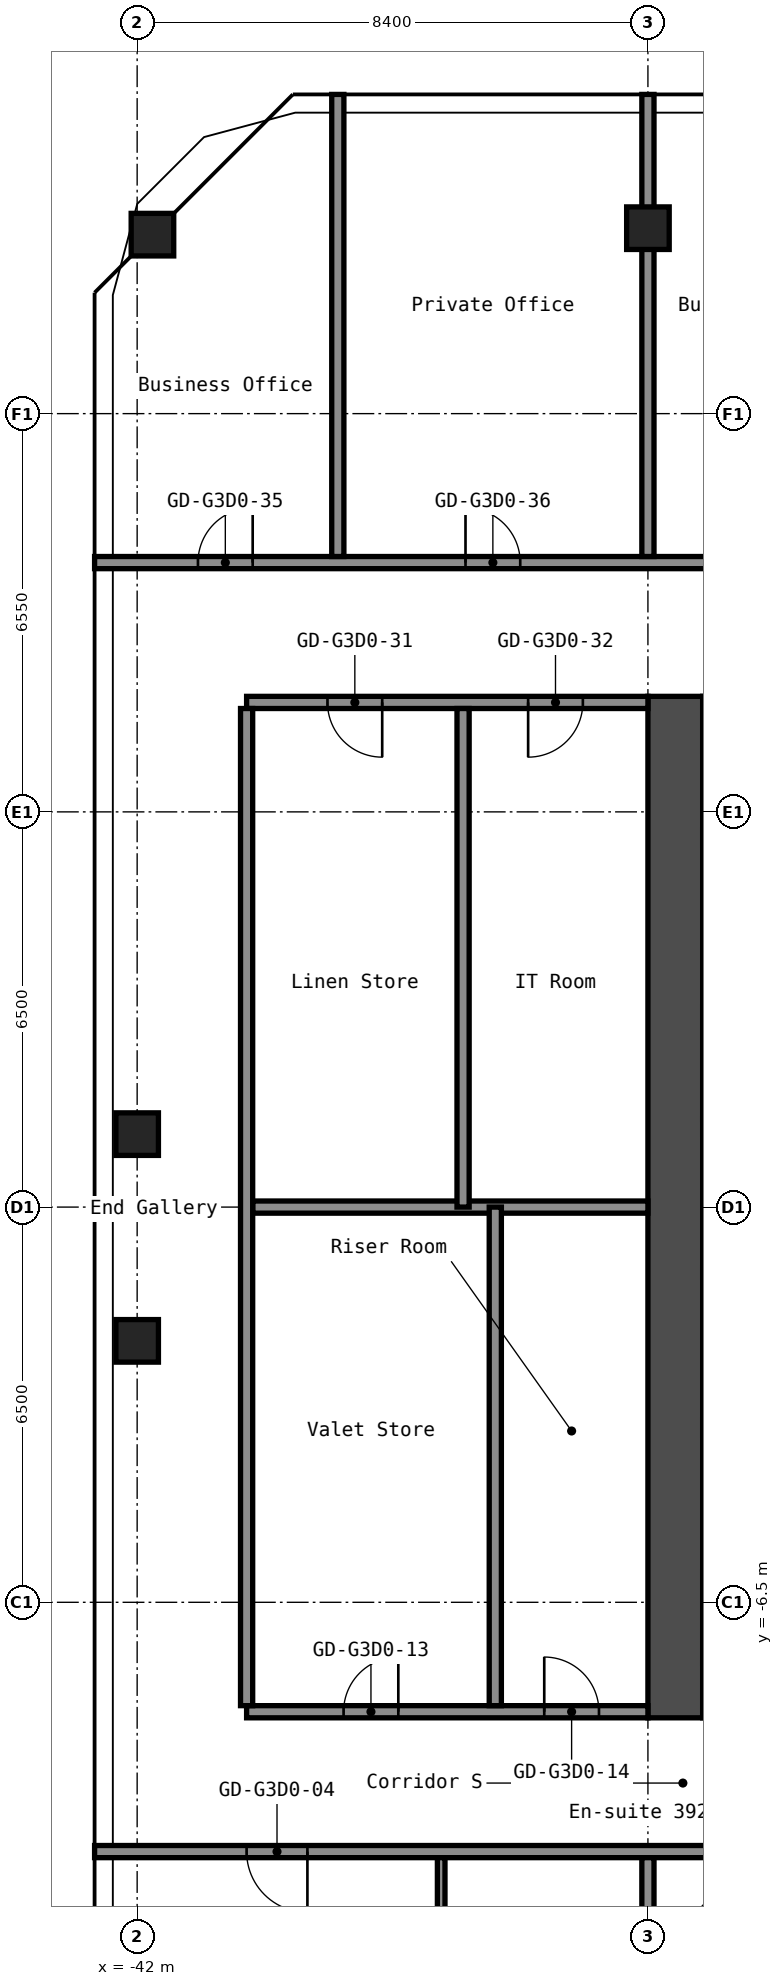
"""IFC4 building model, lengths in metres.
Left out: names, types, materials, properties, quantities, classifications, styles, units other than length and angle.
Written with IfcOpenShell. Run it as: python <this file> out.ifc"""

import sys

from ifc_helpers import new_model, si_unit, direction, frame, frame_2d, origin, origin_2d, place, context, subcontext, project, spatial, rectangle, hollow_rectangle, extrude, element, fill, save


model = new_model("IFC4")
c1 = context("Model", 3, precision=1e-05, world=origin(), true_north=direction((0.0, 1.0)))
c2 = subcontext(c1, "Body", "Model", "MODEL_VIEW")
j1 = project(units=[si_unit("LENGTHUNIT", "METRE"), si_unit("PLANEANGLEUNIT", "RADIAN")], contexts=[c1])
p1 = place(None, origin())
s1 = spatial("IfcSite", under=j1, at=p1, CompositionType="ELEMENT")
p2 = place(p1, origin())
s2 = spatial("IfcBuilding", under=s1, at=p2, CompositionType="ELEMENT")
p3 = place(p2, frame((0.0, 0.0, 140.6)))
s3 = spatial("IfcBuildingStorey", under=s2, at=p3, CompositionType="ELEMENT", Elevation=140.6)
for number, where, z_axis, x_axis in (
    (1, (-42.0, -2.2, 0.0), (0.0, 0.0, 1.0), (1.0, 0.0, 0.0)),
    (2, (-42.0, 1.2, 0.0), (0.0, 0.0, 1.0), (1.0, 0.0, 0.0)),
    (3, (-41.749, 15.994, 0.0), (0.0, 0.0, 1.0), (1.0, 0.0, 0.0)),
    (4, (-33.6, 16.1, 0.0), (0.0, 0.0, 1.0), (1.0, 0.0, 0.0)),
):
    element("IfcColumn", number, at=place(p3, frame(where, z_axis=z_axis, x_axis=x_axis)), inside=s3, PredefinedType="COLUMN", context=c2, shape_type="SweptSolid", body=[
        extrude(hollow_rectangle(XDim=0.7, YDim=0.7, WallThickness=0.028, at=origin_2d()), origin(), (0.0, 0.0, 1.0), 2.75),
    ])
p4 = place(p3, frame((-33.15, -8.4, 0.0), z_axis=(0.0, 0.0, 1.0), x_axis=(0.0, 1.0, 0.0)))
e5 = element("IfcWall", 5, at=p4, inside=s3, PredefinedType="SHEAR", context=c2, shape_type="SweptSolid", body=[
    extrude(rectangle(XDim=16.8, YDim=0.9, at=frame_2d((8.4, 0.0))), origin(), (0.0, 0.0, 1.0), 2.75),
])
p5 = place(p3, frame((-32.7, 1.325, 0.0), z_axis=(0.0, 0.0, 1.0), x_axis=(1.0, 0.0, 0.0)))
e6 = element("IfcWall", 6, at=p5, inside=s3, PredefinedType="SHEAR", context=c2, shape_type="SweptSolid", body=[
    extrude(rectangle(XDim=5.05, YDim=0.25, at=frame_2d((2.525, 0.0))), origin(), (0.0, 0.0, 1.0), 2.75),
])
p6 = place(p5, frame((3.3, 0.0, 0.0)))
e7 = element("IfcOpeningElement", 7, at=p6, cuts=e6, PredefinedType="OPENING", context=c2, shape_type="SweptSolid", body=[
    extrude(rectangle(XDim=1.2, YDim=2.1, at=frame_2d((0.6, 1.05))), frame((0.0, 0.135, 0.0), z_axis=(0.0, -1.0, 0.0), x_axis=(1.0, 0.0, 0.0)), (0.0, 0.0, 1.0), 0.27),
])
p7 = place(p3, frame((-32.7, -3.625, 0.0), z_axis=(0.0, 0.0, 1.0), x_axis=(1.0, 0.0, 0.0)))
e8 = element("IfcWall", 8, at=p7, inside=s3, PredefinedType="SHEAR", context=c2, shape_type="SweptSolid", body=[
    extrude(rectangle(XDim=4.55, YDim=0.25, at=frame_2d((2.275, 0.0))), origin(), (0.0, 0.0, 1.0), 2.75),
])
p8 = place(p7, frame((2.85, 0.0, 0.0)))
e9 = element("IfcOpeningElement", 9, at=p8, cuts=e8, PredefinedType="OPENING", context=c2, shape_type="SweptSolid", body=[
    extrude(rectangle(XDim=1.1, YDim=2.1, at=frame_2d((0.55, 1.05))), frame((0.0, 0.135, 0.0), z_axis=(0.0, -1.0, 0.0), x_axis=(1.0, 0.0, 0.0)), (0.0, 0.0, 1.0), 0.27),
])
p9 = place(p7, frame((0.6, 0.0, 0.0)))
e10 = element("IfcOpeningElement", 10, at=p9, cuts=e8, PredefinedType="OPENING", context=c2, shape_type="SweptSolid", body=[
    extrude(rectangle(XDim=1.1, YDim=2.1, at=frame_2d((0.55, 1.05))), frame((0.0, 0.135, 0.0), z_axis=(0.0, -1.0, 0.0), x_axis=(1.0, 0.0, 0.0)), (0.0, 0.0, 1.0), 0.27),
])
p10 = place(p3, frame((-32.7, -6.75, 0.0), z_axis=(0.0, 0.0, 1.0), x_axis=(1.0, 0.0, 0.0)))
e11 = element("IfcWall", 11, at=p10, inside=s3, PredefinedType="SHEAR", context=c2, shape_type="SweptSolid", body=[
    extrude(rectangle(XDim=4.55, YDim=1.5, at=frame_2d((2.275, 0.0))), origin(), (0.0, 0.0, 1.0), 2.75),
])
p11 = place(p3, frame((-42.7, -10.6, 0.0), z_axis=(0.0, 0.0, 1.0), x_axis=(1.0, 0.0, 0.0)))
e12 = element("IfcWall", 12, at=p11, inside=s3, PredefinedType="PARTITIONING", context=c2, shape_type="SweptSolid", body=[
    extrude(rectangle(XDim=25.9, YDim=0.2, at=frame_2d((12.95, 0.0))), origin(), (0.0, 0.0, 1.0), 2.75),
])
p12 = place(p11, frame((2.5, 0.0, 0.0)))
e13 = element("IfcOpeningElement", 13, at=p12, cuts=e12, PredefinedType="OPENING", context=c2, shape_type="SweptSolid", body=[
    extrude(rectangle(XDim=1.0, YDim=2.1, at=frame_2d((0.5, 1.05))), frame((0.0, 0.11, 0.0), z_axis=(0.0, -1.0, 0.0), x_axis=(1.0, 0.0, 0.0)), (0.0, 0.0, 1.0), 0.22),
])
p13 = place(p11, frame((11.95, 0.0, 0.0)))
e14 = element("IfcOpeningElement", 14, at=p13, cuts=e12, PredefinedType="OPENING", context=c2, shape_type="SweptSolid", body=[
    extrude(rectangle(XDim=1.0, YDim=2.1, at=frame_2d((0.5, 1.05))), frame((0.0, 0.11, 0.0), z_axis=(0.0, -1.0, 0.0), x_axis=(1.0, 0.0, 0.0)), (0.0, 0.0, 1.0), 0.22),
])
p14 = place(p11, frame((13.65, 0.0, 0.0)))
e15 = element("IfcOpeningElement", 15, at=p14, cuts=e12, PredefinedType="OPENING", context=c2, shape_type="SweptSolid", body=[
    extrude(rectangle(XDim=1.0, YDim=2.1, at=frame_2d((0.5, 1.05))), frame((0.0, 0.11, 0.0), z_axis=(0.0, -1.0, 0.0), x_axis=(1.0, 0.0, 0.0)), (0.0, 0.0, 1.0), 0.22),
])
p15 = place(p11, frame((22.9, 0.0, 0.0)))
e16 = element("IfcOpeningElement", 16, at=p15, cuts=e12, PredefinedType="OPENING", context=c2, shape_type="SweptSolid", body=[
    extrude(rectangle(XDim=1.0, YDim=2.1, at=frame_2d((0.5, 1.05))), frame((0.0, 0.11, 0.0), z_axis=(0.0, -1.0, 0.0), x_axis=(1.0, 0.0, 0.0)), (0.0, 0.0, 1.0), 0.22),
])
p16 = place(p3, frame((-40.2, -8.3, 0.0), z_axis=(0.0, 0.0, 1.0), x_axis=(1.0, 0.0, 0.0)))
e17 = element("IfcWall", 17, at=p16, inside=s3, PredefinedType="PARTITIONING", context=c2, shape_type="SweptSolid", body=[
    extrude(rectangle(XDim=6.6, YDim=0.2, at=frame_2d((3.3, 0.0))), origin(), (0.0, 0.0, 1.0), 2.75),
])
p17 = place(p16, frame((1.595, 0.0, 0.0)))
e18 = element("IfcOpeningElement", 18, at=p17, cuts=e17, PredefinedType="OPENING", context=c2, shape_type="SweptSolid", body=[
    extrude(rectangle(XDim=0.9, YDim=2.1, at=frame_2d((0.45, 1.05))), frame((0.0, 0.11, 0.0), z_axis=(0.0, -1.0, 0.0), x_axis=(1.0, 0.0, 0.0)), (0.0, 0.0, 1.0), 0.22),
])
p18 = place(p16, frame((4.895, 0.0, 0.0)))
e19 = element("IfcOpeningElement", 19, at=p18, cuts=e17, PredefinedType="OPENING", context=c2, shape_type="SweptSolid", body=[
    extrude(rectangle(XDim=0.9, YDim=2.1, at=frame_2d((0.45, 1.05))), frame((0.0, 0.11, 0.0), z_axis=(0.0, -1.0, 0.0), x_axis=(1.0, 0.0, 0.0)), (0.0, 0.0, 1.0), 0.22),
])
p19 = place(p3, frame((-40.1, 0.0, 0.0), z_axis=(0.0, 0.0, 1.0), x_axis=(1.0, 0.0, 0.0)))
e20 = element("IfcWall", 20, at=p19, inside=s3, PredefinedType="PARTITIONING", context=c2, shape_type="SweptSolid", body=[
    extrude(rectangle(XDim=6.5, YDim=0.2, at=frame_2d((3.25, 0.0))), origin(), (0.0, 0.0, 1.0), 2.75),
])
p20 = place(p3, frame((-40.2, 8.3, 0.0), z_axis=(0.0, 0.0, 1.0), x_axis=(1.0, 0.0, 0.0)))
e21 = element("IfcWall", 21, at=p20, inside=s3, PredefinedType="PARTITIONING", context=c2, shape_type="SweptSolid", body=[
    extrude(rectangle(XDim=6.6, YDim=0.2, at=frame_2d((3.3, 0.0))), origin(), (0.0, 0.0, 1.0), 2.75),
])
p21 = place(p20, frame((1.33, 0.0, 0.0)))
e22 = element("IfcOpeningElement", 22, at=p21, cuts=e21, PredefinedType="OPENING", context=c2, shape_type="SweptSolid", body=[
    extrude(rectangle(XDim=0.9, YDim=2.1, at=frame_2d((0.45, 1.05))), frame((0.0, 0.11, 0.0), z_axis=(0.0, -1.0, 0.0), x_axis=(1.0, 0.0, 0.0)), (0.0, 0.0, 1.0), 0.22),
])
p22 = place(p20, frame((4.63, 0.0, 0.0)))
e23 = element("IfcOpeningElement", 23, at=p22, cuts=e21, PredefinedType="OPENING", context=c2, shape_type="SweptSolid", body=[
    extrude(rectangle(XDim=0.9, YDim=2.1, at=frame_2d((0.45, 1.05))), frame((0.0, 0.11, 0.0), z_axis=(0.0, -1.0, 0.0), x_axis=(1.0, 0.0, 0.0)), (0.0, 0.0, 1.0), 0.22),
])
p23 = place(p3, frame((-42.7, 10.6, 0.0), z_axis=(0.0, 0.0, 1.0), x_axis=(1.0, 0.0, 0.0)))
e24 = element("IfcWall", 24, at=p23, inside=s3, PredefinedType="PARTITIONING", context=c2, shape_type="SweptSolid", body=[
    extrude(rectangle(XDim=25.9, YDim=0.2, at=frame_2d((12.95, 0.0))), origin(), (0.0, 0.0, 1.0), 2.75),
])
p24 = place(p23, frame((1.7, 0.0, 0.0)))
e25 = element("IfcOpeningElement", 25, at=p24, cuts=e24, PredefinedType="OPENING", context=c2, shape_type="SweptSolid", body=[
    extrude(rectangle(XDim=0.9, YDim=2.1, at=frame_2d((0.45, 1.05))), frame((0.0, 0.11, 0.0), z_axis=(0.0, -1.0, 0.0), x_axis=(1.0, 0.0, 0.0)), (0.0, 0.0, 1.0), 0.22),
])
p25 = place(p23, frame((6.1, 0.0, 0.0)))
e26 = element("IfcOpeningElement", 26, at=p25, cuts=e24, PredefinedType="OPENING", context=c2, shape_type="SweptSolid", body=[
    extrude(rectangle(XDim=0.9, YDim=2.1, at=frame_2d((0.45, 1.05))), frame((0.0, 0.11, 0.0), z_axis=(0.0, -1.0, 0.0), x_axis=(1.0, 0.0, 0.0)), (0.0, 0.0, 1.0), 0.22),
])
p26 = place(p23, frame((10.58, 0.0, 0.0)))
e27 = element("IfcOpeningElement", 27, at=p26, cuts=e24, PredefinedType="OPENING", context=c2, shape_type="SweptSolid", body=[
    extrude(rectangle(XDim=0.9, YDim=2.1, at=frame_2d((0.45, 1.05))), frame((0.0, 0.11, 0.0), z_axis=(0.0, -1.0, 0.0), x_axis=(1.0, 0.0, 0.0)), (0.0, 0.0, 1.0), 0.22),
])
p27 = place(p23, frame((14.78, 0.0, 0.0)))
e28 = element("IfcOpeningElement", 28, at=p27, cuts=e24, PredefinedType="OPENING", context=c2, shape_type="SweptSolid", body=[
    extrude(rectangle(XDim=0.9, YDim=2.1, at=frame_2d((0.45, 1.05))), frame((0.0, 0.11, 0.0), z_axis=(0.0, -1.0, 0.0), x_axis=(1.0, 0.0, 0.0)), (0.0, 0.0, 1.0), 0.22),
])
p28 = place(p23, frame((19.4, 0.0, 0.0)))
e29 = element("IfcOpeningElement", 29, at=p28, cuts=e24, PredefinedType="OPENING", context=c2, shape_type="SweptSolid", body=[
    extrude(rectangle(XDim=0.9, YDim=2.1, at=frame_2d((0.45, 1.05))), frame((0.0, 0.11, 0.0), z_axis=(0.0, -1.0, 0.0), x_axis=(1.0, 0.0, 0.0)), (0.0, 0.0, 1.0), 0.22),
])
p29 = place(p23, frame((23.6, 0.0, 0.0)))
e30 = element("IfcOpeningElement", 30, at=p29, cuts=e24, PredefinedType="OPENING", context=c2, shape_type="SweptSolid", body=[
    extrude(rectangle(XDim=0.9, YDim=2.1, at=frame_2d((0.45, 1.05))), frame((0.0, 0.11, 0.0), z_axis=(0.0, -1.0, 0.0), x_axis=(1.0, 0.0, 0.0)), (0.0, 0.0, 1.0), 0.22),
])
p30 = place(p3, frame((-40.2, -8.2, 0.0), z_axis=(0.0, 0.0, 1.0), x_axis=(0.0, 1.0, 0.0)))
e31 = element("IfcWall", 31, at=p30, inside=s3, PredefinedType="PARTITIONING", context=c2, shape_type="SweptSolid", body=[
    extrude(rectangle(XDim=16.4, YDim=0.2, at=frame_2d((8.2, 0.0))), origin(), (0.0, 0.0, 1.0), 2.75),
])
p31 = place(p3, frame((-38.7, 10.7, 0.0), z_axis=(0.0, 0.0, 1.0), x_axis=(0.0, 1.0, 0.0)))
e32 = element("IfcWall", 32, at=p31, inside=s3, PredefinedType="PARTITIONING", context=c2, shape_type="SweptSolid", body=[
    extrude(rectangle(XDim=7.6, YDim=0.2, at=frame_2d((3.8, 0.0))), origin(), (0.0, 0.0, 1.0), 2.75),
])
p32 = place(p3, frame((-37.0, -14.0, 0.0), z_axis=(0.0, 0.0, 1.0), x_axis=(0.0, 1.0, 0.0)))
e33 = element("IfcWall", 33, at=p32, inside=s3, PredefinedType="PARTITIONING", context=c2, shape_type="SweptSolid", body=[
    extrude(rectangle(XDim=3.3, YDim=0.125, at=frame_2d((1.65, 0.0))), origin(), (0.0, 0.0, 1.0), 2.75),
])
for number, where, z_axis, x_axis in (
    (34, (-36.64, 0.0, 0.0), (0.0, 0.0, 1.0), (0.0, 1.0, 0.0)),
    (35, (-36.11, -8.2, 0.0), (0.0, 0.0, 1.0), (0.0, 1.0, 0.0)),
):
    element("IfcWall", number, at=place(p3, frame(where, z_axis=z_axis, x_axis=x_axis)), inside=s3, PredefinedType="PARTITIONING", context=c2, shape_type="SweptSolid", body=[
        extrude(rectangle(XDim=8.2, YDim=0.2, at=frame_2d((4.1, 0.0))), origin(), (0.0, 0.0, 1.0), 2.75),
    ])
p33 = place(p3, frame((-33.6, -19.3, 0.0), z_axis=(0.0, 0.0, 1.0), x_axis=(0.0, 1.0, 0.0)))
e36 = element("IfcWall", 36, at=p33, inside=s3, PredefinedType="PARTITIONING", context=c2, shape_type="SweptSolid", body=[
    extrude(rectangle(XDim=8.6, YDim=0.2, at=frame_2d((4.3, 0.0))), origin(), (0.0, 0.0, 1.0), 2.75),
])
p34 = place(p3, frame((-33.6, 10.7, 0.0), z_axis=(0.0, 0.0, 1.0), x_axis=(0.0, 1.0, 0.0)))
e37 = element("IfcWall", 37, at=p34, inside=s3, PredefinedType="PARTITIONING", context=c2, shape_type="SweptSolid", body=[
    extrude(rectangle(XDim=7.6, YDim=0.2, at=frame_2d((3.8, 0.0))), origin(), (0.0, 0.0, 1.0), 2.75),
])
p35 = place(p12, origin())
e38 = element("IfcDoor", 38, at=p35, inside=s3, OperationType="SINGLE_SWING_RIGHT", PredefinedType="DOOR", context=c2, shape_type="SweptSolid", body=[
    extrude(rectangle(XDim=1.0, YDim=2.1, at=frame_2d((0.5, 1.05))), frame((0.0, 0.025, 0.0), z_axis=(0.0, -1.0, 0.0), x_axis=(1.0, 0.0, 0.0)), (0.0, 0.0, 1.0), 0.05),
])
fill(e13, e38)
p36 = place(p17, origin())
e39 = element("IfcDoor", 39, at=p36, inside=s3, OperationType="SINGLE_SWING_LEFT", PredefinedType="DOOR", context=c2, shape_type="SweptSolid", body=[
    extrude(rectangle(XDim=0.9, YDim=2.1, at=frame_2d((0.45, 1.05))), frame((0.0, 0.025, 0.0), z_axis=(0.0, -1.0, 0.0), x_axis=(1.0, 0.0, 0.0)), (0.0, 0.0, 1.0), 0.05),
])
fill(e18, e39)
p37 = place(p18, origin())
e40 = element("IfcDoor", 40, at=p37, inside=s3, OperationType="SINGLE_SWING_RIGHT", PredefinedType="DOOR", context=c2, shape_type="SweptSolid", body=[
    extrude(rectangle(XDim=0.9, YDim=2.1, at=frame_2d((0.45, 1.05))), frame((0.0, 0.025, 0.0), z_axis=(0.0, -1.0, 0.0), x_axis=(1.0, 0.0, 0.0)), (0.0, 0.0, 1.0), 0.05),
])
fill(e19, e40)
p38 = place(p21, origin())
e41 = element("IfcDoor", 41, at=p38, inside=s3, OperationType="SINGLE_SWING_RIGHT", PredefinedType="DOOR", context=c2, shape_type="SweptSolid", body=[
    extrude(rectangle(XDim=0.9, YDim=2.1, at=frame_2d((0.45, 1.05))), frame((0.0, 0.025, 0.0), z_axis=(0.0, -1.0, 0.0), x_axis=(1.0, 0.0, 0.0)), (0.0, 0.0, 1.0), 0.05),
])
fill(e22, e41)
p39 = place(p22, origin())
e42 = element("IfcDoor", 42, at=p39, inside=s3, OperationType="SINGLE_SWING_LEFT", PredefinedType="DOOR", context=c2, shape_type="SweptSolid", body=[
    extrude(rectangle(XDim=0.9, YDim=2.1, at=frame_2d((0.45, 1.05))), frame((0.0, 0.025, 0.0), z_axis=(0.0, -1.0, 0.0), x_axis=(1.0, 0.0, 0.0)), (0.0, 0.0, 1.0), 0.05),
])
fill(e23, e42)
p40 = place(p24, origin())
e43 = element("IfcDoor", 43, at=p40, inside=s3, OperationType="SINGLE_SWING_LEFT", PredefinedType="DOOR", context=c2, shape_type="SweptSolid", body=[
    extrude(rectangle(XDim=0.9, YDim=2.1, at=frame_2d((0.45, 1.05))), frame((0.0, 0.025, 0.0), z_axis=(0.0, -1.0, 0.0), x_axis=(1.0, 0.0, 0.0)), (0.0, 0.0, 1.0), 0.05),
])
fill(e25, e43)
p41 = place(p25, origin())
e44 = element("IfcDoor", 44, at=p41, inside=s3, OperationType="SINGLE_SWING_RIGHT", PredefinedType="DOOR", context=c2, shape_type="SweptSolid", body=[
    extrude(rectangle(XDim=0.9, YDim=2.1, at=frame_2d((0.45, 1.05))), frame((0.0, 0.025, 0.0), z_axis=(0.0, -1.0, 0.0), x_axis=(1.0, 0.0, 0.0)), (0.0, 0.0, 1.0), 0.05),
])
fill(e26, e44)
save(model, sys.argv[1])
